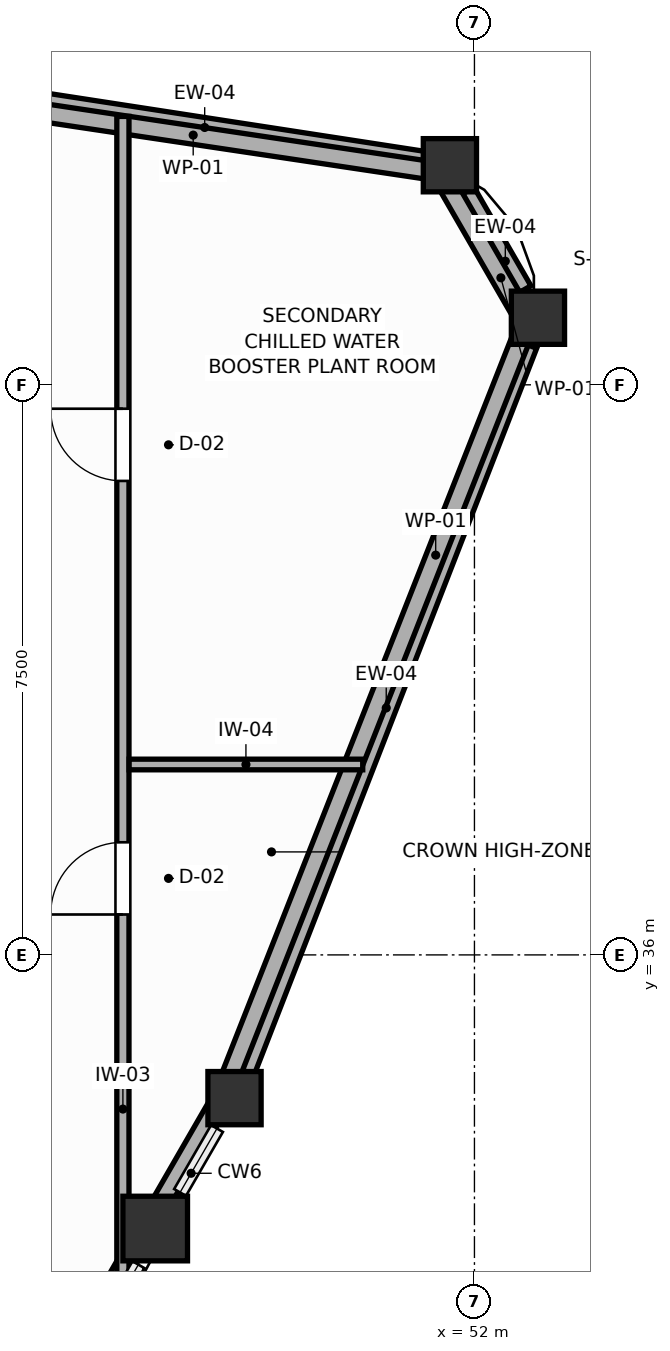
"""IFC4 building model, lengths in metres.
Left out: names, types, materials, properties, quantities, classifications, styles, units other than length and angle.
Written with IfcOpenShell. Run it as: python <this file> out.ifc"""

import sys

from ifc_helpers import new_model, si_unit, direction, frame, frame_2d, origin, origin_2d, place, context, subcontext, project, spatial, rectangle, extrude, source, transform, mapped, element, fill, save


model = new_model("IFC4")
c1 = context("Model", 3, precision=1e-05, world=origin(), true_north=direction((0.0, 1.0)))
c2 = subcontext(c1, "Body", "Model", "MODEL_VIEW")
j1 = project(units=[si_unit("LENGTHUNIT", "METRE"), si_unit("PLANEANGLEUNIT", "RADIAN")], contexts=[c1])
p1 = place(None, origin())
s1 = spatial("IfcSite", under=j1, at=p1, CompositionType="ELEMENT")
p2 = place(p1, origin())
s2 = spatial("IfcBuilding", under=s1, at=p2, CompositionType="ELEMENT")
p3 = place(p2, frame((0.0, 0.0, 296.1)))
s3 = spatial("IfcBuildingStorey", under=s2, at=p3, CompositionType="ELEMENT", Elevation=296.1)
m1 = source(origin(), c2, "Body", "SweptSolid", [
    extrude(rectangle(XDim=0.85, YDim=0.85, at=origin_2d()), origin(), (0.0, 0.0, 1.0), 3.6),
])
p4 = place(p3, frame((47.8, 32.4, 0.0), z_axis=(0.0, 0.0, 1.0), x_axis=(1.0, 0.0, 0.0)))
e1 = element("IfcColumn", 1, at=p4, inside=s3, PredefinedType="COLUMN", context=c2, shape_type="MappedRepresentation", body=[
    mapped(m1, transform((0.0, 0.0, 0.0), scale=1.0)),
])
m2 = source(origin(), c2, "Body", "SweptSolid", [
    extrude(rectangle(XDim=0.7, YDim=0.7, at=origin_2d()), origin(), (0.0, 0.0, 1.0), 3.6),
])
for number, where, z_axis, x_axis in (
    (2, (52.835, 44.382, 0.0), (0.0, 0.0, 1.0), (1.0, 0.0, 0.0)),
    (3, (51.677, 46.389, 0.0), (0.0, 0.0, 1.0), (1.0, 0.0, 0.0)),
    (4, (48.844, 34.115, 0.0), (0.0, 0.0, 1.0), (1.0, 0.0, 0.0)),
):
    element("IfcColumn", number, at=place(p3, frame(where, z_axis=z_axis, x_axis=x_axis)), inside=s3, PredefinedType="COLUMN", context=c2, shape_type="MappedRepresentation", body=[
        mapped(m2, transform((0.0, 0.0, 0.0), scale=1.0)),
    ])
p5 = place(p3, frame((52.631, 44.737, 0.0), z_axis=(0.0, 0.0, 1.0), x_axis=(-0.500033033937, 0.866006330792, 0.0)))
e5 = element("IfcWall", 5, at=p5, inside=s3, PredefinedType="SOLIDWALL", context=c2, shape_type="SweptSolid", body=[
    extrude(rectangle(XDim=1.497, YDim=0.26, at=frame_2d((0.749, 0.0))), origin(), (0.0, 0.0, 1.0), 3.01),
])
p6 = place(p3, frame((51.322, 46.444, 0.0), z_axis=(0.0, 0.0, 1.0), x_axis=(-0.98836100704, 0.152126656979, 0.0)))
e6 = element("IfcWall", 6, at=p6, inside=s3, PredefinedType="SOLIDWALL", context=c2, shape_type="SweptSolid", body=[
    extrude(rectangle(XDim=5.81, YDim=0.26, at=frame_2d((2.905, 0.0))), origin(), (0.0, 0.0, 1.0), 3.01),
])
p7 = place(p3, frame((48.981, 34.471, 0.0), z_axis=(0.0, 0.0, 1.0), x_axis=(0.362411790687, 0.93201807599, 0.0)))
e7 = element("IfcWall", 7, at=p7, inside=s3, PredefinedType="SOLIDWALL", context=c2, shape_type="SweptSolid", body=[
    extrude(rectangle(XDim=10.254, YDim=0.26, at=frame_2d((5.127, 0.0))), origin(), (0.0, 0.0, 1.0), 3.01),
])
p8 = place(p3, frame((52.692, 44.311, 3.6), z_axis=(0.0, 0.0, 1.0), x_axis=(-0.500059783319, 0.865990885118, 0.0)))
e8 = element("IfcWall", 8, at=p8, inside=s3, PredefinedType="PARAPET", context=c2, shape_type="SweptSolid", body=[
    extrude(rectangle(XDim=2.297, YDim=0.24, at=frame_2d((1.148, 0.0))), origin(), (0.0, 0.0, 1.0), 0.24),
])
p9 = place(p3, frame((51.544, 46.3, 3.6), z_axis=(0.0, 0.0, 1.0), x_axis=(-0.989016466777, 0.147805373529, 0.0)))
e9 = element("IfcWall", 9, at=p9, inside=s3, PredefinedType="PARAPET", context=c2, shape_type="SweptSolid", body=[
    extrude(rectangle(XDim=10.933, YDim=0.24, at=frame_2d((5.467, 0.0))), origin(), (0.0, 0.0, 1.0), 0.24),
])
p10 = place(p3, frame((43.954, 25.945, 3.6), z_axis=(0.0, 0.0, 1.0), x_axis=(0.500007603729, 0.866021013725, 0.0)))
e10 = element("IfcWall", 10, at=p10, inside=s3, PredefinedType="PARAPET", context=c2, shape_type="SweptSolid", body=[
    extrude(rectangle(XDim=9.462, YDim=0.24, at=frame_2d((4.731, 0.0))), origin(), (0.0, 0.0, 1.0), 0.24),
])
p11 = place(p3, frame((48.685, 34.139, 3.6), z_axis=(0.0, 0.0, 1.0), x_axis=(0.366515145825, 0.930412084982, 0.0)))
e11 = element("IfcWall", 11, at=p11, inside=s3, PredefinedType="PARAPET", context=c2, shape_type="SweptSolid", body=[
    extrude(rectangle(XDim=10.933, YDim=0.24, at=frame_2d((5.466, 0.0))), origin(), (0.0, 0.0, 1.0), 0.24),
])
p12 = place(p3, frame((47.375, 31.592, 0.0), z_axis=(0.0, 0.0, 1.0), x_axis=(0.0, 1.0, 0.0)))
e12 = element("IfcWall", 12, at=p12, inside=s3, PredefinedType="PARTITIONING", context=c2, shape_type="SweptSolid", body=[
    extrude(rectangle(XDim=15.439, YDim=0.16, at=frame_2d((7.719, 0.0))), origin(), (0.0, 0.0, 1.0), 3.01),
])
p13 = place(p12, frame((4.939, 0.0, 0.0)))
e13 = element("IfcOpeningElement", 13, at=p13, cuts=e12, PredefinedType="OPENING", context=c2, shape_type="SweptSolid", body=[
    extrude(rectangle(XDim=0.95, YDim=2.05, at=frame_2d((0.475, 1.025))), frame((0.0, 0.09, 0.0), z_axis=(0.0, -1.0, 0.0), x_axis=(1.0, 0.0, 0.0)), (0.0, 0.0, 1.0), 0.18),
])
p14 = place(p12, frame((10.643, 0.0, 0.0)))
e14 = element("IfcOpeningElement", 14, at=p14, cuts=e12, PredefinedType="OPENING", context=c2, shape_type="SweptSolid", body=[
    extrude(rectangle(XDim=0.95, YDim=2.05, at=frame_2d((0.475, 1.025))), frame((0.0, 0.09, 0.0), z_axis=(0.0, -1.0, 0.0), x_axis=(1.0, 0.0, 0.0)), (0.0, 0.0, 1.0), 0.18),
])
p15 = place(p3, frame((47.457, 38.505, 0.0), z_axis=(0.0, 0.0, 1.0), x_axis=(1.0, 0.0, 0.0)))
e15 = element("IfcWall", 15, at=p15, inside=s3, PredefinedType="PARTITIONING", context=c2, shape_type="SweptSolid", body=[
    extrude(rectangle(XDim=3.073, YDim=0.14, at=frame_2d((1.537, 0.0))), origin(), (0.0, 0.0, 1.0), 3.34),
])
p16 = place(p13, origin())
e16 = element("IfcDoor", 16, at=p16, inside=s3, OperationType="SINGLE_SWING_LEFT", PredefinedType="DOOR", context=c2, shape_type="SweptSolid", body=[
    extrude(rectangle(XDim=0.95, YDim=2.05, at=frame_2d((0.475, 1.025))), frame((0.0, 0.025, 0.0), z_axis=(0.0, -1.0, 0.0), x_axis=(1.0, 0.0, 0.0)), (0.0, 0.0, 1.0), 0.05),
])
fill(e13, e16)
p17 = place(p14, origin())
e17 = element("IfcDoor", 17, at=p17, inside=s3, OperationType="SINGLE_SWING_RIGHT", PredefinedType="DOOR", context=c2, shape_type="SweptSolid", body=[
    extrude(rectangle(XDim=0.95, YDim=2.05, at=frame_2d((0.475, 1.025))), frame((0.0, 0.025, 0.0), z_axis=(0.0, -1.0, 0.0), x_axis=(1.0, 0.0, 0.0)), (0.0, 0.0, 1.0), 0.05),
])
fill(e14, e17)
save(model, sys.argv[1])
